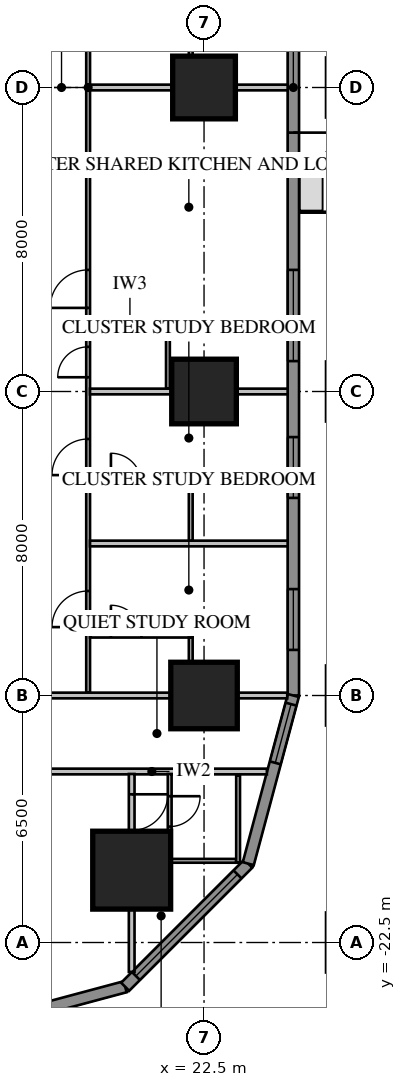
"""IFC4 building model, lengths in metres.
Left out: names, types, materials, properties, quantities, classifications, styles, units other than length and angle.
Written with IfcOpenShell. Run it as: python <this file> out.ifc"""

import sys

from ifc_helpers import new_model, si_unit, direction, frame, frame_2d, origin, origin_2d, place, context, subcontext, project, spatial, rectangle, extrude, element, fill, save


model = new_model("IFC4")
c1 = context("Model", 3, precision=1e-05, world=origin(), true_north=direction((0.0, 1.0)))
c2 = subcontext(c1, "Body", "Model", "MODEL_VIEW")
j1 = project(units=[si_unit("LENGTHUNIT", "METRE"), si_unit("PLANEANGLEUNIT", "RADIAN")], contexts=[c1])
p1 = place(None, origin())
s1 = spatial("IfcSite", under=j1, at=p1, CompositionType="ELEMENT")
p2 = place(p1, origin())
s2 = spatial("IfcBuilding", under=s1, at=p2, CompositionType="ELEMENT")
p3 = place(p2, frame((0.0, 0.0, 27.55)))
s3 = spatial("IfcBuildingStorey", under=s2, at=p3, CompositionType="ELEMENT", Elevation=27.55)
p4 = place(p3, frame((22.5, -16.0, 0.0), z_axis=(0.0, 0.0, 1.0), x_axis=(1.0, 0.0, 0.0)))
e1 = element("IfcColumn", 1, at=p4, inside=s3, PredefinedType="COLUMN", context=c2, shape_type="SweptSolid", body=[
    extrude(rectangle(XDim=1.75, YDim=1.75, at=origin_2d()), origin(), (0.0, 0.0, 1.0), 3.85),
])
p5 = place(p3, frame((22.5, -8.0, 0.0), z_axis=(0.0, 0.0, 1.0), x_axis=(1.0, 0.0, 0.0)))
e2 = element("IfcColumn", 2, at=p5, inside=s3, PredefinedType="COLUMN", context=c2, shape_type="SweptSolid", body=[
    extrude(rectangle(XDim=1.7, YDim=1.7, at=origin_2d()), origin(), (0.0, 0.0, 1.0), 3.85),
])
p6 = place(p3, frame((22.5, 0.0, 0.0), z_axis=(0.0, 0.0, 1.0), x_axis=(1.0, 0.0, 0.0)))
e3 = element("IfcColumn", 3, at=p6, inside=s3, PredefinedType="COLUMN", context=c2, shape_type="SweptSolid", body=[
    extrude(rectangle(XDim=1.65, YDim=1.65, at=origin_2d()), origin(), (0.0, 0.0, 1.0), 3.85),
])
p7 = place(p3, frame((20.596, -20.596, 0.0), z_axis=(0.0, 0.0, 1.0), x_axis=(1.0, 0.0, 0.0)))
e4 = element("IfcColumn", 4, at=p7, inside=s3, PredefinedType="COLUMN", context=c2, shape_type="SweptSolid", body=[
    extrude(rectangle(XDim=2.05, YDim=2.05, at=origin_2d()), origin(), (0.0, 0.0, 1.0), 3.85),
])
p8 = place(p3, frame((24.85, -16.0, 0.0), z_axis=(0.0, 0.0, 1.0), x_axis=(0.0, 1.0, 0.0)))
e5 = element("IfcWall", 5, at=p8, inside=s3, PredefinedType="SOLIDWALL", context=c2, shape_type="SweptSolid", body=[
    extrude(rectangle(XDim=32.0, YDim=0.3, at=frame_2d((16.0, 0.0))), origin(), (0.0, 0.0, 1.0), 3.65),
])
p9 = place(p8, frame((1.2, 0.0, 0.75)))
e6 = element("IfcOpeningElement", 6, at=p9, cuts=e5, PredefinedType="OPENING", context=c2, shape_type="SweptSolid", body=[
    extrude(rectangle(XDim=1.6, YDim=1.8, at=frame_2d((0.8, 0.9))), frame((0.0, 0.17, 0.0), z_axis=(0.0, -1.0, 0.0), x_axis=(1.0, 0.0, 0.0)), (0.0, 0.0, 1.0), 0.34),
])
p10 = place(p8, frame((5.2, 0.0, 0.75)))
e7 = element("IfcOpeningElement", 7, at=p10, cuts=e5, PredefinedType="OPENING", context=c2, shape_type="SweptSolid", body=[
    extrude(rectangle(XDim=1.6, YDim=1.8, at=frame_2d((0.8, 0.9))), frame((0.0, 0.17, 0.0), z_axis=(0.0, -1.0, 0.0), x_axis=(1.0, 0.0, 0.0)), (0.0, 0.0, 1.0), 0.34),
])
p11 = place(p8, frame((17.2, 0.0, 0.75)))
e8 = element("IfcOpeningElement", 8, at=p11, cuts=e5, PredefinedType="OPENING", context=c2, shape_type="SweptSolid", body=[
    extrude(rectangle(XDim=1.6, YDim=1.8, at=frame_2d((0.8, 0.9))), frame((0.0, 0.17, 0.0), z_axis=(0.0, -1.0, 0.0), x_axis=(1.0, 0.0, 0.0)), (0.0, 0.0, 1.0), 0.34),
])
p12 = place(p8, frame((21.2, 0.0, 0.75)))
e9 = element("IfcOpeningElement", 9, at=p12, cuts=e5, PredefinedType="OPENING", context=c2, shape_type="SweptSolid", body=[
    extrude(rectangle(XDim=1.6, YDim=1.8, at=frame_2d((0.8, 0.9))), frame((0.0, 0.17, 0.0), z_axis=(0.0, -1.0, 0.0), x_axis=(1.0, 0.0, 0.0)), (0.0, 0.0, 1.0), 0.34),
])
p13 = place(p8, frame((25.2, 0.0, 0.75)))
e10 = element("IfcOpeningElement", 10, at=p13, cuts=e5, PredefinedType="OPENING", context=c2, shape_type="SweptSolid", body=[
    extrude(rectangle(XDim=1.6, YDim=1.8, at=frame_2d((0.8, 0.9))), frame((0.0, 0.17, 0.0), z_axis=(0.0, -1.0, 0.0), x_axis=(1.0, 0.0, 0.0)), (0.0, 0.0, 1.0), 0.34),
])
p14 = place(p8, frame((29.2, 0.0, 0.75)))
e11 = element("IfcOpeningElement", 11, at=p14, cuts=e5, PredefinedType="OPENING", context=c2, shape_type="SweptSolid", body=[
    extrude(rectangle(XDim=1.6, YDim=1.8, at=frame_2d((0.8, 0.9))), frame((0.0, 0.17, 0.0), z_axis=(0.0, -1.0, 0.0), x_axis=(1.0, 0.0, 0.0)), (0.0, 0.0, 1.0), 0.34),
])
p15 = place(p8, frame((8.8, 0.0, 0.75)))
e12 = element("IfcOpeningElement", 12, at=p15, cuts=e5, PredefinedType="OPENING", context=c2, shape_type="SweptSolid", body=[
    extrude(rectangle(XDim=2.4, YDim=1.8, at=frame_2d((1.2, 0.9))), frame((0.0, 0.17, 0.0), z_axis=(0.0, -1.0, 0.0), x_axis=(1.0, 0.0, 0.0)), (0.0, 0.0, 1.0), 0.34),
])
p16 = place(p8, frame((13.812, 0.0, 0.0)))
e13 = element("IfcOpeningElement", 13, at=p16, cuts=e5, PredefinedType="OPENING", context=c2, shape_type="SweptSolid", body=[
    extrude(rectangle(XDim=1.0, YDim=2.4, at=frame_2d((0.5, 1.2))), frame((0.0, 0.17, 0.0), z_axis=(0.0, -1.0, 0.0), x_axis=(1.0, 0.0, 0.0)), (0.0, 0.0, 1.0), 0.34),
])
p17 = place(p3, frame((16.0, -24.85, 0.0), z_axis=(0.0, 0.0, 1.0), x_axis=(0.965920218567, 0.258839972501, 0.0)))
e14 = element("IfcWall", 14, at=p17, inside=s3, PredefinedType="SOLIDWALL", context=c2, shape_type="SweptSolid", body=[
    extrude(rectangle(XDim=4.581, YDim=0.3, at=frame_2d((2.291, 0.0))), origin(), (0.0, 0.0, 1.0), 3.65),
])
p18 = place(p3, frame((20.425, -23.664, 0.0), z_axis=(0.0, 0.0, 1.0), x_axis=(0.707106781187, 0.707106781187, 0.0)))
e15 = element("IfcWall", 15, at=p18, inside=s3, PredefinedType="SOLIDWALL", context=c2, shape_type="SweptSolid", body=[
    extrude(rectangle(XDim=4.581, YDim=0.3, at=frame_2d((2.291, 0.0))), origin(), (0.0, 0.0, 1.0), 3.65),
])
p19 = place(p18, frame((0.4, 0.0, 0.75)))
e16 = element("IfcOpeningElement", 16, at=p19, cuts=e15, PredefinedType="OPENING", context=c2, shape_type="SweptSolid", body=[
    extrude(rectangle(XDim=3.781, YDim=1.8, at=frame_2d((1.891, 0.9))), frame((0.0, 0.17, 0.0), z_axis=(0.0, -1.0, 0.0), x_axis=(1.0, 0.0, 0.0)), (0.0, 0.0, 1.0), 0.34),
])
p20 = place(p3, frame((23.664, -20.425, 0.0), z_axis=(0.0, 0.0, 1.0), x_axis=(0.258839972501, 0.965920218567, 0.0)))
e17 = element("IfcWall", 17, at=p20, inside=s3, PredefinedType="SOLIDWALL", context=c2, shape_type="SweptSolid", body=[
    extrude(rectangle(XDim=4.581, YDim=0.3, at=frame_2d((2.291, 0.0))), origin(), (0.0, 0.0, 1.0), 3.65),
])
p21 = place(p20, frame((2.746, 0.0, 0.75)))
e18 = element("IfcOpeningElement", 18, at=p21, cuts=e17, PredefinedType="OPENING", context=c2, shape_type="SweptSolid", body=[
    extrude(rectangle(XDim=1.6, YDim=1.8, at=frame_2d((0.8, 0.9))), frame((0.0, 0.17, 0.0), z_axis=(0.0, -1.0, 0.0), x_axis=(1.0, 0.0, 0.0)), (0.0, 0.0, 1.0), 0.34),
])
p22 = place(p3, frame((19.45, -15.925, 0.0), z_axis=(0.0, 0.0, 1.0), x_axis=(0.0, 1.0, 0.0)))
e19 = element("IfcWall", 19, at=p22, inside=s3, PredefinedType="PARTITIONING", context=c2, shape_type="SweptSolid", body=[
    extrude(rectangle(XDim=31.85, YDim=0.1, at=frame_2d((15.925, 0.0))), origin(), (0.0, 0.0, 1.0), 3.65),
])
p23 = place(p22, frame((10.125, 0.0, 0.0)))
e20 = element("IfcOpeningElement", 20, at=p23, cuts=e19, PredefinedType="OPENING", context=c2, shape_type="SweptSolid", body=[
    extrude(rectangle(XDim=1.0, YDim=2.1, at=frame_2d((0.5, 1.05))), frame((0.0, 0.07, 0.0), z_axis=(0.0, -1.0, 0.0), x_axis=(1.0, 0.0, 0.0)), (0.0, 0.0, 1.0), 0.14),
])
p24 = place(p22, frame((8.3, 0.0, 0.0)))
e21 = element("IfcOpeningElement", 21, at=p24, cuts=e19, PredefinedType="OPENING", context=c2, shape_type="SweptSolid", body=[
    extrude(rectangle(XDim=0.8, YDim=2.1, at=frame_2d((0.4, 1.05))), frame((0.0, 0.07, 0.0), z_axis=(0.0, -1.0, 0.0), x_axis=(1.0, 0.0, 0.0)), (0.0, 0.0, 1.0), 0.14),
])
p25 = place(p22, frame((1.725, 0.0, 0.0)))
e22 = element("IfcOpeningElement", 22, at=p25, cuts=e19, PredefinedType="OPENING", context=c2, shape_type="SweptSolid", body=[
    extrude(rectangle(XDim=0.95, YDim=2.1, at=frame_2d((0.475, 1.05))), frame((0.0, 0.07, 0.0), z_axis=(0.0, -1.0, 0.0), x_axis=(1.0, 0.0, 0.0)), (0.0, 0.0, 1.0), 0.14),
])
p26 = place(p22, frame((5.725, 0.0, 0.0)))
e23 = element("IfcOpeningElement", 23, at=p26, cuts=e19, PredefinedType="OPENING", context=c2, shape_type="SweptSolid", body=[
    extrude(rectangle(XDim=0.95, YDim=2.1, at=frame_2d((0.475, 1.05))), frame((0.0, 0.07, 0.0), z_axis=(0.0, -1.0, 0.0), x_axis=(1.0, 0.0, 0.0)), (0.0, 0.0, 1.0), 0.14),
])
p27 = place(p22, frame((17.725, 0.0, 0.0)))
e24 = element("IfcOpeningElement", 24, at=p27, cuts=e19, PredefinedType="OPENING", context=c2, shape_type="SweptSolid", body=[
    extrude(rectangle(XDim=0.95, YDim=2.1, at=frame_2d((0.475, 1.05))), frame((0.0, 0.07, 0.0), z_axis=(0.0, -1.0, 0.0), x_axis=(1.0, 0.0, 0.0)), (0.0, 0.0, 1.0), 0.14),
])
p28 = place(p22, frame((21.725, 0.0, 0.0)))
e25 = element("IfcOpeningElement", 25, at=p28, cuts=e19, PredefinedType="OPENING", context=c2, shape_type="SweptSolid", body=[
    extrude(rectangle(XDim=0.95, YDim=2.1, at=frame_2d((0.475, 1.05))), frame((0.0, 0.07, 0.0), z_axis=(0.0, -1.0, 0.0), x_axis=(1.0, 0.0, 0.0)), (0.0, 0.0, 1.0), 0.14),
])
p29 = place(p22, frame((25.725, 0.0, 0.0)))
e26 = element("IfcOpeningElement", 26, at=p29, cuts=e19, PredefinedType="OPENING", context=c2, shape_type="SweptSolid", body=[
    extrude(rectangle(XDim=0.95, YDim=2.1, at=frame_2d((0.475, 1.05))), frame((0.0, 0.07, 0.0), z_axis=(0.0, -1.0, 0.0), x_axis=(1.0, 0.0, 0.0)), (0.0, 0.0, 1.0), 0.14),
])
p30 = place(p22, frame((29.725, 0.0, 0.0)))
e27 = element("IfcOpeningElement", 27, at=p30, cuts=e19, PredefinedType="OPENING", context=c2, shape_type="SweptSolid", body=[
    extrude(rectangle(XDim=0.95, YDim=2.1, at=frame_2d((0.475, 1.05))), frame((0.0, 0.07, 0.0), z_axis=(0.0, -1.0, 0.0), x_axis=(1.0, 0.0, 0.0)), (0.0, 0.0, 1.0), 0.14),
])
p31 = place(p3, frame((19.5, -6.275, 0.0), z_axis=(0.0, 0.0, 1.0), x_axis=(1.0, 0.0, 0.0)))
e28 = element("IfcWall", 28, at=p31, inside=s3, PredefinedType="PARTITIONING", context=c2, shape_type="SweptSolid", body=[
    extrude(rectangle(XDim=2.1, YDim=0.1, at=frame_2d((1.05, 0.0))), origin(), (0.0, 0.0, 1.0), 3.65),
])
p32 = place(p3, frame((21.55, -7.925, 0.0), z_axis=(0.0, 0.0, 1.0), x_axis=(0.0, 1.0, 0.0)))
e29 = element("IfcWall", 29, at=p32, inside=s3, PredefinedType="PARTITIONING", context=c2, shape_type="SweptSolid", body=[
    extrude(rectangle(XDim=1.7, YDim=0.1, at=frame_2d((0.85, 0.0))), origin(), (0.0, 0.0, 1.0), 3.65),
])
p33 = place(p3, frame((18.1, -18.0, 0.0), z_axis=(0.0, 0.0, 1.0), x_axis=(1.0, 0.0, 0.0)))
e30 = element("IfcWall", 30, at=p33, inside=s3, PredefinedType="PARTITIONING", context=c2, shape_type="SweptSolid", body=[
    extrude(rectangle(XDim=6.053, YDim=0.15, at=frame_2d((3.027, 0.0))), origin(), (0.0, 0.0, 1.0), 3.65),
])
p34 = place(p3, frame((18.1, -16.0, 0.0), z_axis=(0.0, 0.0, 1.0), x_axis=(1.0, 0.0, 0.0)))
e31 = element("IfcWall", 31, at=p34, inside=s3, PredefinedType="PARTITIONING", context=c2, shape_type="SweptSolid", body=[
    extrude(rectangle(XDim=6.589, YDim=0.15, at=frame_2d((3.295, 0.0))), origin(), (0.0, 0.0, 1.0), 3.65),
])
for number, where, z_axis, x_axis in (
    (32, (19.5, -12.0, 0.0), (0.0, 0.0, 1.0), (1.0, 0.0, 0.0)),
    (33, (19.5, -8.0, 0.0), (0.0, 0.0, 1.0), (1.0, 0.0, 0.0)),
):
    element("IfcWall", number, at=place(p3, frame(where, z_axis=z_axis, x_axis=x_axis)), inside=s3, PredefinedType="PARTITIONING", context=c2, shape_type="SweptSolid", body=[
        extrude(rectangle(XDim=5.2, YDim=0.15, at=frame_2d((2.6, 0.0))), origin(), (0.0, 0.0, 1.0), 3.65),
    ])
p35 = place(p3, frame((19.5, 0.0, 0.0), z_axis=(0.0, 0.0, 1.0), x_axis=(1.0, 0.0, 0.0)))
e34 = element("IfcWall", 34, at=p35, inside=s3, PredefinedType="PARTITIONING", context=c2, shape_type="SweptSolid", body=[
    extrude(rectangle(XDim=5.2, YDim=0.15, at=frame_2d((2.6, 0.0))), origin(), (0.0, 0.0, 1.0), 2.957),
])
p36 = place(p3, frame((19.5, -14.425, 0.0), z_axis=(0.0, 0.0, 1.0), x_axis=(1.0, 0.0, 0.0)))
e35 = element("IfcWall", 35, at=p36, inside=s3, PredefinedType="PARTITIONING", context=c2, shape_type="SweptSolid", body=[
    extrude(rectangle(XDim=2.7, YDim=0.1, at=frame_2d((1.35, 0.0))), origin(), (0.0, 0.0, 1.0), 3.65),
])
p37 = place(p36, frame((0.55, 0.0, 0.0)))
e36 = element("IfcOpeningElement", 36, at=p37, cuts=e35, PredefinedType="OPENING", context=c2, shape_type="SweptSolid", body=[
    extrude(rectangle(XDim=0.8, YDim=2.1, at=frame_2d((0.4, 1.05))), frame((0.0, 0.07, 0.0), z_axis=(0.0, -1.0, 0.0), x_axis=(1.0, 0.0, 0.0)), (0.0, 0.0, 1.0), 0.14),
])
p38 = place(p3, frame((22.15, -15.925, 0.0), z_axis=(0.0, 0.0, 1.0), x_axis=(0.0, 1.0, 0.0)))
e37 = element("IfcWall", 37, at=p38, inside=s3, PredefinedType="PARTITIONING", context=c2, shape_type="SweptSolid", body=[
    extrude(rectangle(XDim=1.45, YDim=0.1, at=frame_2d((0.725, 0.0))), origin(), (0.0, 0.0, 1.0), 3.65),
])
p39 = place(p3, frame((19.5, -10.425, 0.0), z_axis=(0.0, 0.0, 1.0), x_axis=(1.0, 0.0, 0.0)))
e38 = element("IfcWall", 38, at=p39, inside=s3, PredefinedType="PARTITIONING", context=c2, shape_type="SweptSolid", body=[
    extrude(rectangle(XDim=2.7, YDim=0.1, at=frame_2d((1.35, 0.0))), origin(), (0.0, 0.0, 1.0), 3.65),
])
p40 = place(p39, frame((0.55, 0.0, 0.0)))
e39 = element("IfcOpeningElement", 39, at=p40, cuts=e38, PredefinedType="OPENING", context=c2, shape_type="SweptSolid", body=[
    extrude(rectangle(XDim=0.8, YDim=2.1, at=frame_2d((0.4, 1.05))), frame((0.0, 0.07, 0.0), z_axis=(0.0, -1.0, 0.0), x_axis=(1.0, 0.0, 0.0)), (0.0, 0.0, 1.0), 0.14),
])
for number, where, z_axis, x_axis in (
    (40, (22.15, -11.925, 0.0), (0.0, 0.0, 1.0), (0.0, 1.0, 0.0)),
    (41, (22.15, 0.075, 0.0), (0.0, 0.0, 1.0), (0.0, 1.0, 0.0)),
):
    element("IfcWall", number, at=place(p3, frame(where, z_axis=z_axis, x_axis=x_axis)), inside=s3, PredefinedType="PARTITIONING", context=c2, shape_type="SweptSolid", body=[
        extrude(rectangle(XDim=1.45, YDim=0.1, at=frame_2d((0.725, 0.0))), origin(), (0.0, 0.0, 1.0), 3.65),
    ])
p41 = place(p3, frame((21.596, -18.065, 0.0), z_axis=(0.0, 0.0, 1.0), x_axis=(0.0, -1.0, 0.0)))
e42 = element("IfcWall", 42, at=p41, inside=s3, PredefinedType="PARTITIONING", context=c2, shape_type="SweptSolid", body=[
    extrude(rectangle(XDim=2.335, YDim=0.1, at=frame_2d((1.167, 0.0))), origin(), (0.0, 0.0, 1.0), 3.65),
])
p42 = place(p41, frame((0.585, 0.0, 0.0)))
e43 = element("IfcOpeningElement", 43, at=p42, cuts=e42, PredefinedType="OPENING", context=c2, shape_type="SweptSolid", body=[
    extrude(rectangle(XDim=0.8, YDim=2.1, at=frame_2d((0.4, 1.05))), frame((0.0, 0.07, 0.0), z_axis=(0.0, -1.0, 0.0), x_axis=(1.0, 0.0, 0.0)), (0.0, 0.0, 1.0), 0.14),
])
p43 = place(p3, frame((21.646, -20.35, 0.0), z_axis=(0.0, 0.0, 1.0), x_axis=(1.0, 0.0, 0.0)))
e44 = element("IfcWall", 44, at=p43, inside=s3, PredefinedType="PARTITIONING", context=c2, shape_type="SweptSolid", body=[
    extrude(rectangle(XDim=1.7, YDim=0.1, at=frame_2d((0.85, 0.0))), origin(), (0.0, 0.0, 1.0), 3.65),
])
p44 = place(p3, frame((23.396, -18.1, 0.0), z_axis=(0.0, 0.0, 1.0), x_axis=(0.0, -1.0, 0.0)))
e45 = element("IfcWall", 45, at=p44, inside=s3, PredefinedType="PARTITIONING", context=c2, shape_type="SweptSolid", body=[
    extrude(rectangle(XDim=2.3, YDim=0.1, at=frame_2d((1.15, 0.0))), origin(), (0.0, 0.0, 1.0), 3.65),
])
p45 = place(p3, frame((20.596, -18.065, 0.0), z_axis=(0.0, 0.0, 1.0), x_axis=(0.0, -1.0, 0.0)))
e46 = element("IfcWall", 46, at=p45, inside=s3, PredefinedType="PARTITIONING", context=c2, shape_type="SweptSolid", body=[
    extrude(rectangle(XDim=5.209, YDim=0.15, at=frame_2d((2.604, 0.0))), origin(), (0.0, 0.0, 1.0), 3.65),
])
p46 = place(p45, frame((0.535, 0.0, 0.0)))
e47 = element("IfcOpeningElement", 47, at=p46, cuts=e46, PredefinedType="OPENING", context=c2, shape_type="SweptSolid", body=[
    extrude(rectangle(XDim=0.95, YDim=2.1, at=frame_2d((0.475, 1.05))), frame((0.0, 0.095, 0.0), z_axis=(0.0, -1.0, 0.0), x_axis=(1.0, 0.0, 0.0)), (0.0, 0.0, 1.0), 0.19),
])
p47 = place(p21, origin())
e48 = element("IfcWindow", 48, at=p47, inside=s3, PartitioningType="SINGLE_PANEL", PredefinedType="WINDOW", context=c2, shape_type="SweptSolid", body=[
    extrude(rectangle(XDim=1.6, YDim=1.8, at=frame_2d((0.8, 0.9))), frame((0.0, 0.03, 0.0), z_axis=(0.0, -1.0, 0.0), x_axis=(1.0, 0.0, 0.0)), (0.0, 0.0, 1.0), 0.06),
])
fill(e18, e48)
p48 = place(p9, origin())
e49 = element("IfcWindow", 49, at=p48, inside=s3, PartitioningType="SINGLE_PANEL", PredefinedType="WINDOW", context=c2, shape_type="SweptSolid", body=[
    extrude(rectangle(XDim=1.6, YDim=1.8, at=frame_2d((0.8, 0.9))), frame((0.0, 0.03, 0.0), z_axis=(0.0, -1.0, 0.0), x_axis=(1.0, 0.0, 0.0)), (0.0, 0.0, 1.0), 0.06),
])
fill(e6, e49)
p49 = place(p10, origin())
e50 = element("IfcWindow", 50, at=p49, inside=s3, PartitioningType="SINGLE_PANEL", PredefinedType="WINDOW", context=c2, shape_type="SweptSolid", body=[
    extrude(rectangle(XDim=1.6, YDim=1.8, at=frame_2d((0.8, 0.9))), frame((0.0, 0.03, 0.0), z_axis=(0.0, -1.0, 0.0), x_axis=(1.0, 0.0, 0.0)), (0.0, 0.0, 1.0), 0.06),
])
fill(e7, e50)
p50 = place(p15, origin())
e51 = element("IfcWindow", 51, at=p50, inside=s3, PartitioningType="SINGLE_PANEL", PredefinedType="WINDOW", context=c2, shape_type="SweptSolid", body=[
    extrude(rectangle(XDim=2.4, YDim=1.8, at=frame_2d((1.2, 0.9))), frame((0.0, 0.03, 0.0), z_axis=(0.0, -1.0, 0.0), x_axis=(1.0, 0.0, 0.0)), (0.0, 0.0, 1.0), 0.06),
])
fill(e12, e51)
p51 = place(p19, origin())
e52 = element("IfcWindow", 52, at=p51, inside=s3, PartitioningType="SINGLE_PANEL", PredefinedType="WINDOW", context=c2, shape_type="SweptSolid", body=[
    extrude(rectangle(XDim=3.781, YDim=1.8, at=frame_2d((1.891, 0.9))), frame((0.0, 0.03, 0.0), z_axis=(0.0, -1.0, 0.0), x_axis=(1.0, 0.0, 0.0)), (0.0, 0.0, 1.0), 0.06),
])
fill(e16, e52)
p52 = place(p16, origin())
e53 = element("IfcDoor", 53, at=p52, inside=s3, OperationType="SINGLE_SWING_RIGHT", PredefinedType="DOOR", context=c2, shape_type="SweptSolid", body=[
    extrude(rectangle(XDim=1.0, YDim=2.4, at=frame_2d((0.5, 1.2))), frame((0.0, 0.025, 0.0), z_axis=(0.0, -1.0, 0.0), x_axis=(1.0, 0.0, 0.0)), (0.0, 0.0, 1.0), 0.05),
])
fill(e13, e53)
p53 = place(p23, origin())
e54 = element("IfcDoor", 54, at=p53, inside=s3, OperationType="SINGLE_SWING_LEFT", PredefinedType="DOOR", context=c2, shape_type="SweptSolid", body=[
    extrude(rectangle(XDim=1.0, YDim=2.1, at=frame_2d((0.5, 1.05))), frame((0.0, 0.025, 0.0), z_axis=(0.0, -1.0, 0.0), x_axis=(1.0, 0.0, 0.0)), (0.0, 0.0, 1.0), 0.05),
])
fill(e20, e54)
p54 = place(p24, origin())
e55 = element("IfcDoor", 55, at=p54, inside=s3, OperationType="SINGLE_SWING_LEFT", PredefinedType="DOOR", context=c2, shape_type="SweptSolid", body=[
    extrude(rectangle(XDim=0.8, YDim=2.1, at=frame_2d((0.4, 1.05))), frame((0.0, 0.025, 0.0), z_axis=(0.0, -1.0, 0.0), x_axis=(1.0, 0.0, 0.0)), (0.0, 0.0, 1.0), 0.05),
])
fill(e21, e55)
p55 = place(p25, origin())
e56 = element("IfcDoor", 56, at=p55, inside=s3, OperationType="SINGLE_SWING_LEFT", PredefinedType="DOOR", context=c2, shape_type="SweptSolid", body=[
    extrude(rectangle(XDim=0.95, YDim=2.1, at=frame_2d((0.475, 1.05))), frame((0.0, 0.025, 0.0), z_axis=(0.0, -1.0, 0.0), x_axis=(1.0, 0.0, 0.0)), (0.0, 0.0, 1.0), 0.05),
])
fill(e22, e56)
p56 = place(p37, origin())
e57 = element("IfcDoor", 57, at=p56, inside=s3, OperationType="SINGLE_SWING_LEFT", PredefinedType="DOOR", context=c2, shape_type="SweptSolid", body=[
    extrude(rectangle(XDim=0.8, YDim=2.1, at=frame_2d((0.4, 1.05))), frame((0.0, 0.025, 0.0), z_axis=(0.0, -1.0, 0.0), x_axis=(1.0, 0.0, 0.0)), (0.0, 0.0, 1.0), 0.05),
])
fill(e36, e57)
p57 = place(p26, origin())
e58 = element("IfcDoor", 58, at=p57, inside=s3, OperationType="SINGLE_SWING_LEFT", PredefinedType="DOOR", context=c2, shape_type="SweptSolid", body=[
    extrude(rectangle(XDim=0.95, YDim=2.1, at=frame_2d((0.475, 1.05))), frame((0.0, 0.025, 0.0), z_axis=(0.0, -1.0, 0.0), x_axis=(1.0, 0.0, 0.0)), (0.0, 0.0, 1.0), 0.05),
])
fill(e23, e58)
p58 = place(p40, origin())
e59 = element("IfcDoor", 59, at=p58, inside=s3, OperationType="SINGLE_SWING_LEFT", PredefinedType="DOOR", context=c2, shape_type="SweptSolid", body=[
    extrude(rectangle(XDim=0.8, YDim=2.1, at=frame_2d((0.4, 1.05))), frame((0.0, 0.025, 0.0), z_axis=(0.0, -1.0, 0.0), x_axis=(1.0, 0.0, 0.0)), (0.0, 0.0, 1.0), 0.05),
])
fill(e39, e59)
p59 = place(p42, origin())
e60 = element("IfcDoor", 60, at=p59, inside=s3, OperationType="SINGLE_SWING_LEFT", PredefinedType="DOOR", context=c2, shape_type="SweptSolid", body=[
    extrude(rectangle(XDim=0.8, YDim=2.1, at=frame_2d((0.4, 1.05))), frame((0.0, 0.025, 0.0), z_axis=(0.0, -1.0, 0.0), x_axis=(1.0, 0.0, 0.0)), (0.0, 0.0, 1.0), 0.05),
])
fill(e43, e60)
p60 = place(p46, origin())
e61 = element("IfcDoor", 61, at=p60, inside=s3, OperationType="SINGLE_SWING_LEFT", PredefinedType="DOOR", context=c2, shape_type="SweptSolid", body=[
    extrude(rectangle(XDim=0.95, YDim=2.1, at=frame_2d((0.475, 1.05))), frame((0.0, 0.025, 0.0), z_axis=(0.0, -1.0, 0.0), x_axis=(1.0, 0.0, 0.0)), (0.0, 0.0, 1.0), 0.05),
])
fill(e47, e61)
save(model, sys.argv[1])
